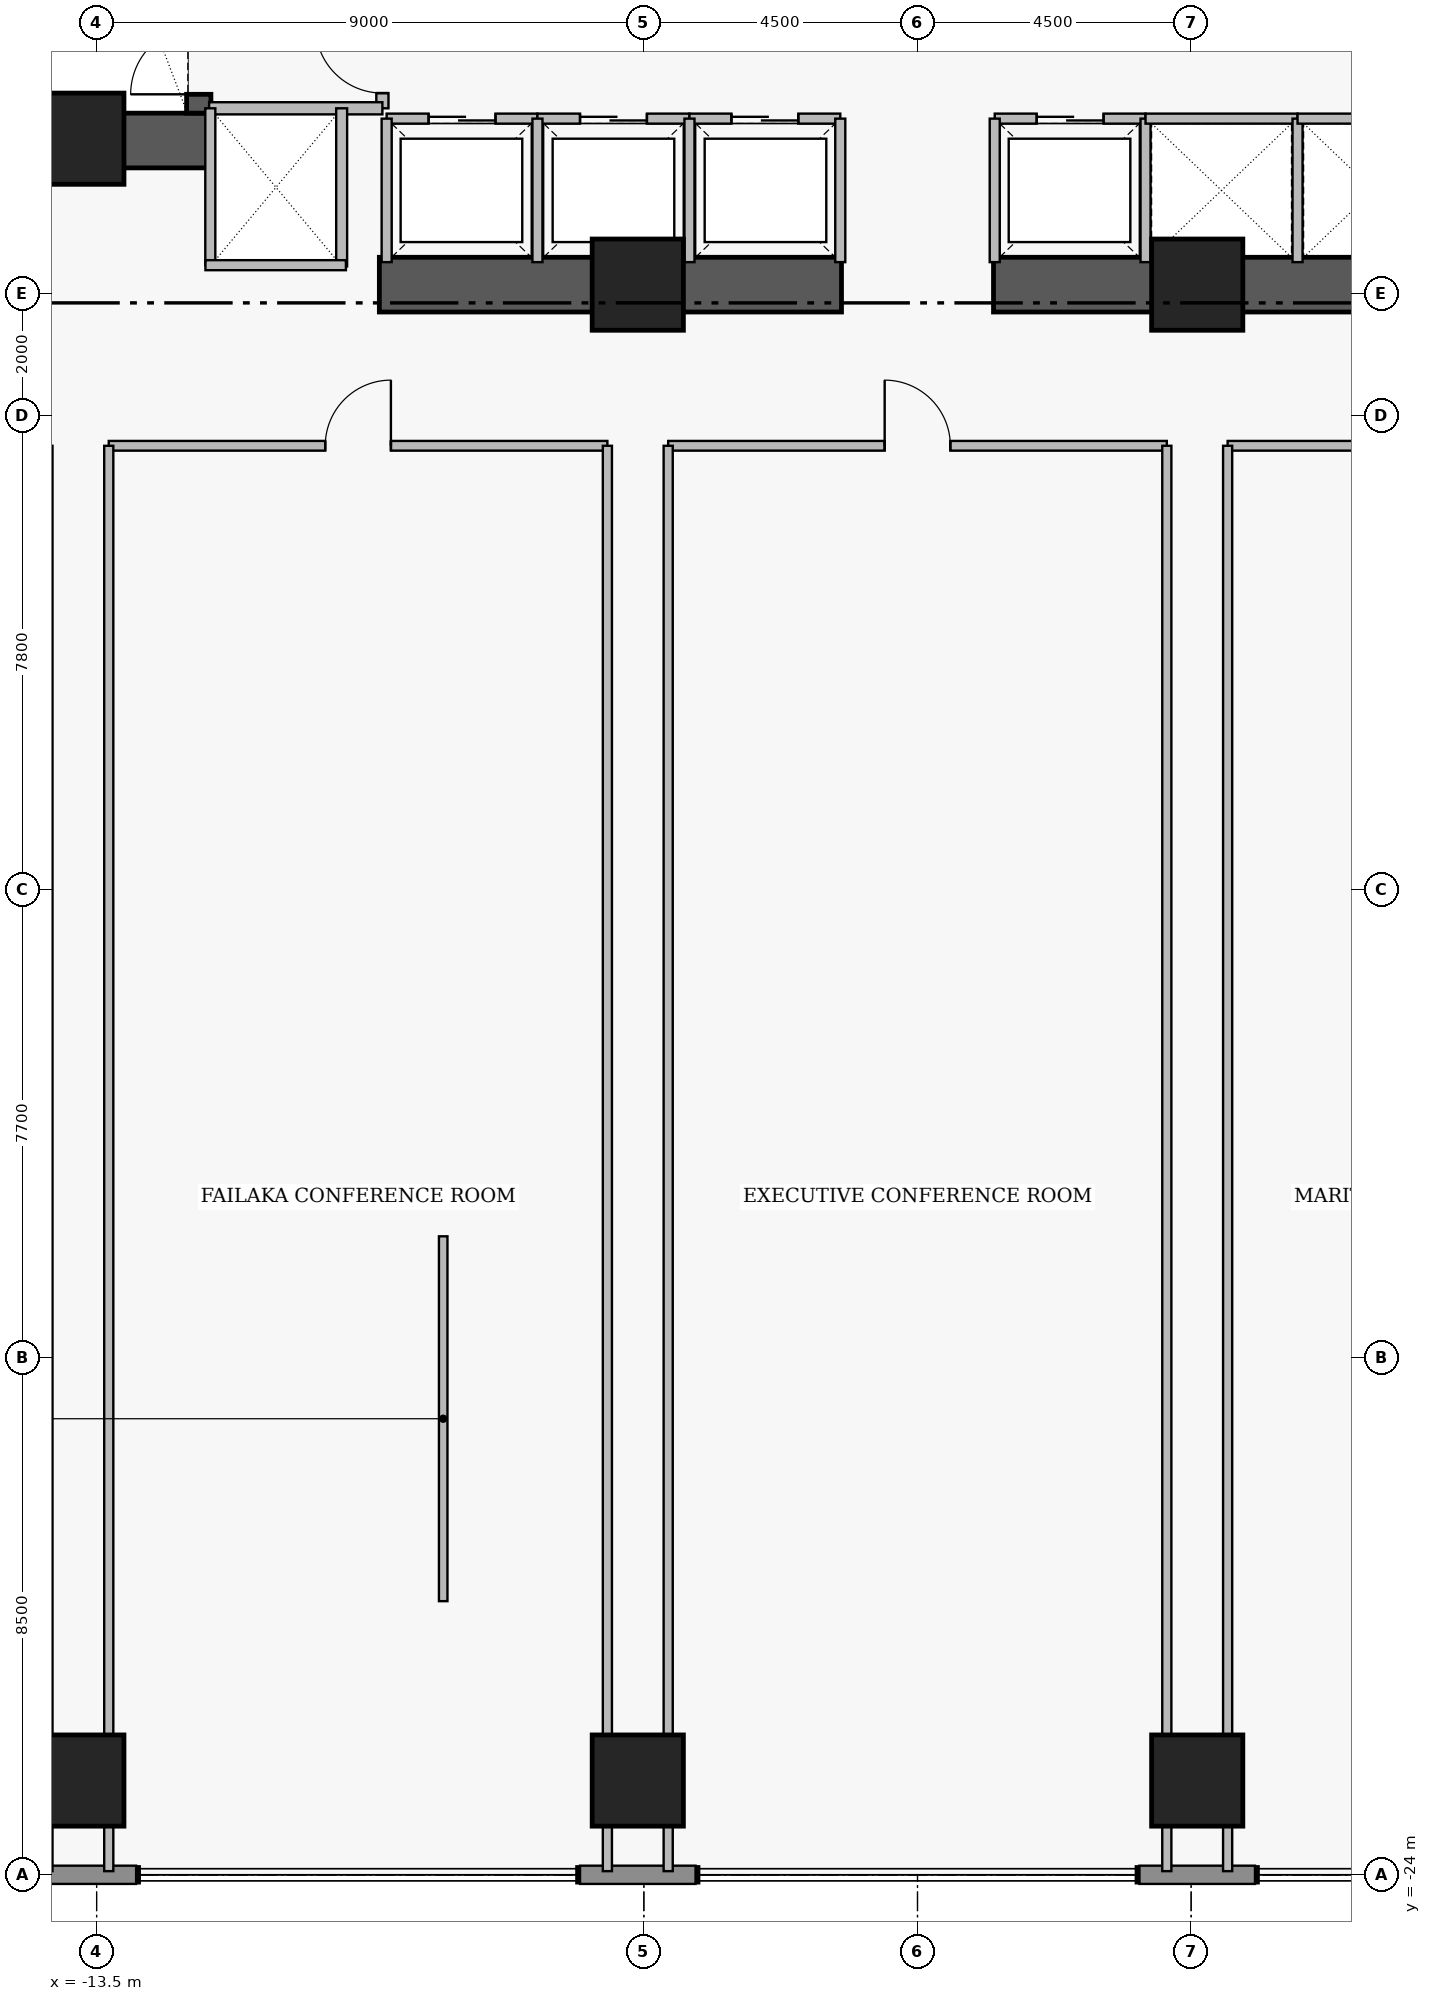
"""IFC4 building model, lengths in metres.
Left out: names, types, materials, properties, quantities, classifications, styles, units other than length and angle.
Written with IfcOpenShell. Run it as: python <this file> out.ifc"""

import sys

from ifc_helpers import new_model, si_unit, direction, frame, frame_2d, origin, origin_2d, place, context, subcontext, project, spatial, rectangle, extrude, element, fill, save


model = new_model("IFC4")
c1 = context("Model", 3, precision=1e-05, world=origin(), true_north=direction((0.0, 1.0)))
c2 = subcontext(c1, "Body", "Model", "MODEL_VIEW")
j1 = project(units=[si_unit("LENGTHUNIT", "METRE"), si_unit("PLANEANGLEUNIT", "RADIAN")], contexts=[c1])
p1 = place(None, origin())
s1 = spatial("IfcSite", under=j1, at=p1, CompositionType="ELEMENT")
p2 = place(p1, origin())
s2 = spatial("IfcBuilding", under=s1, at=p2, CompositionType="ELEMENT")
p3 = place(p2, frame((0.0, 0.0, 18.0)))
s3 = spatial("IfcBuildingStorey", under=s2, at=p3, CompositionType="ELEMENT", Elevation=18.0)
p4 = place(p3, frame((-16.31, 4.52, 0.0), z_axis=(0.0, 0.0, 1.0), x_axis=(1.0, 0.0, 0.0)))
e1 = element("IfcWall", 1, at=p4, inside=s3, PredefinedType="SHEAR", context=c2, shape_type="SweptSolid", body=[
    extrude(rectangle(XDim=4.71, YDim=0.9, at=frame_2d((2.355, 0.0))), origin(), (0.0, 0.0, 1.0), 4.61),
])
for number, where, z_axis, x_axis in (
    (2, (-8.85, 2.15, 0.0), (0.0, 0.0, 1.0), (1.0, 0.0, 0.0)),
    (3, (1.25, 2.15, 0.0), (0.0, 0.0, 1.0), (1.0, 0.0, 0.0)),
):
    element("IfcWall", number, at=place(p3, frame(where, z_axis=z_axis, x_axis=x_axis)), inside=s3, PredefinedType="SHEAR", context=c2, shape_type="SweptSolid", body=[
        extrude(rectangle(XDim=7.6, YDim=0.9, at=frame_2d((3.8, 0.0))), origin(), (0.0, 0.0, 1.0), 4.54),
    ])
p5 = place(p3, frame((-11.82, 4.97, 0.0), z_axis=(0.0, 0.0, 1.0), x_axis=(0.0, 1.0, 0.0)))
e4 = element("IfcWall", 4, at=p5, inside=s3, PredefinedType="SHEAR", context=c2, shape_type="SweptSolid", body=[
    extrude(rectangle(XDim=8.96, YDim=0.4, at=frame_2d((4.48, 0.0))), origin(), (0.0, 0.0, 1.0), 4.61),
])
p6 = place(p5, frame((0.31, 0.0, 0.0)))
e5 = element("IfcOpeningElement", 5, at=p6, cuts=e4, PredefinedType="OPENING", context=c2, shape_type="SweptSolid", body=[
    extrude(rectangle(XDim=1.12, YDim=2.22, at=frame_2d((0.56, 1.11))), frame((0.0, 0.21, 0.0), z_axis=(0.0, -1.0, 0.0), x_axis=(1.0, 0.0, 0.0)), (0.0, 0.0, 1.0), 0.42),
])
for number, where, z_axis, x_axis in (
    (6, (-13.8, 4.55, 0.0), (0.0, 0.0, 1.0), (1.0, 0.0, 0.0)),
    (7, (-4.6, 2.15, 0.0), (0.0, 0.0, 1.0), (1.0, 0.0, 0.0)),
    (8, (4.6, 2.15, 0.0), (0.0, 0.0, 1.0), (1.0, 0.0, 0.0)),
    (9, (-13.8, -22.45, 0.0), (0.0, 0.0, 1.0), (1.0, 0.0, 0.0)),
    (10, (-4.6, -22.45, 0.0), (0.0, 0.0, 1.0), (1.0, 0.0, 0.0)),
    (11, (4.6, -22.45, 0.0), (0.0, 0.0, 1.0), (1.0, 0.0, 0.0)),
):
    element("IfcColumn", number, at=place(p3, frame(where, z_axis=z_axis, x_axis=x_axis)), inside=s3, PredefinedType="COLUMN", context=c2, shape_type="SweptSolid", body=[
        extrude(rectangle(XDim=1.5, YDim=1.5, at=origin_2d()), origin(), (0.0, 0.0, 1.0), 4.8),
    ])
for number, where, z_axis, x_axis in (
    (12, (5.55, -24.0, 0.0), (0.0, 0.0, 1.0), (-1.0, 0.0, 0.0)),
    (13, (-3.65, -24.0, 0.0), (0.0, 0.0, 1.0), (-1.0, 0.0, 0.0)),
):
    element("IfcWall", number, at=place(p3, frame(where, z_axis=z_axis, x_axis=x_axis)), inside=s3, PredefinedType="STANDARD", context=c2, shape_type="SweptSolid", body=[
        extrude(rectangle(XDim=1.9, YDim=0.3, at=frame_2d((0.95, 0.0))), origin(), (0.0, 0.0, 1.0), 4.54),
    ])
p7 = place(p3, frame((-12.85, -24.0, 0.0), z_axis=(0.0, 0.0, 1.0), x_axis=(-1.0, 0.0, 0.0)))
e14 = element("IfcWall", 14, at=p7, inside=s3, PredefinedType="STANDARD", context=c2, shape_type="SweptSolid", body=[
    extrude(rectangle(XDim=1.9, YDim=0.3, at=frame_2d((0.95, 0.0))), origin(), (0.0, 0.0, 1.0), 4.54),
])
p8 = place(p3, frame((-8.8, 5.05, 0.0), z_axis=(0.0, 0.0, 1.0), x_axis=(0.0, 1.0, 0.0)))
e15 = element("IfcWall", 15, at=p8, inside=s3, PredefinedType="PARTITIONING", context=c2, shape_type="SweptSolid", body=[
    extrude(rectangle(XDim=6.1, YDim=0.2, at=frame_2d((3.05, 0.0))), origin(), (0.0, 0.0, 1.0), 4.54),
])
p9 = place(p8, frame((0.25, 0.0, 0.0)))
e16 = element("IfcOpeningElement", 16, at=p9, cuts=e15, PredefinedType="OPENING", context=c2, shape_type="SweptSolid", body=[
    extrude(rectangle(XDim=1.1, YDim=2.2, at=frame_2d((0.55, 1.1))), frame((0.0, 0.11, 0.0), z_axis=(0.0, -1.0, 0.0), x_axis=(1.0, 0.0, 0.0)), (0.0, 0.0, 1.0), 0.22),
])
p10 = place(p8, frame((3.85, 0.0, 0.0)))
e17 = element("IfcOpeningElement", 17, at=p10, cuts=e15, PredefinedType="OPENING", context=c2, shape_type="SweptSolid", body=[
    extrude(rectangle(XDim=1.1, YDim=2.2, at=frame_2d((0.55, 1.1))), frame((0.0, 0.11, 0.0), z_axis=(0.0, -1.0, 0.0), x_axis=(1.0, 0.0, 0.0)), (0.0, 0.0, 1.0), 0.22),
])
p11 = place(p3, frame((-8.73, 4.88, 0.0), z_axis=(0.0, 0.0, 1.0), x_axis=(1.0, 0.0, 0.0)))
e18 = element("IfcWall", 18, at=p11, inside=s3, PredefinedType="PARTITIONING", context=c2, shape_type="SweptSolid", body=[
    extrude(rectangle(XDim=2.48, YDim=0.165, at=frame_2d((1.24, 0.0))), origin(), (0.0, 0.0, 1.0), 4.54),
])
p12 = place(p11, frame((0.69, 0.0, 0.0)))
e19 = element("IfcOpeningElement", 19, at=p12, cuts=e18, PredefinedType="OPENING", context=c2, shape_type="SweptSolid", body=[
    extrude(rectangle(XDim=1.1, YDim=2.25, at=frame_2d((0.55, 1.125))), frame((0.0, 0.093, 0.0), z_axis=(0.0, -1.0, 0.0), x_axis=(1.0, 0.0, 0.0)), (0.0, 0.0, 1.0), 0.185),
])
p13 = place(p3, frame((-6.25, 4.88, 0.0), z_axis=(0.0, 0.0, 1.0), x_axis=(1.0, 0.0, 0.0)))
e20 = element("IfcWall", 20, at=p13, inside=s3, PredefinedType="PARTITIONING", context=c2, shape_type="SweptSolid", body=[
    extrude(rectangle(XDim=2.5, YDim=0.165, at=frame_2d((1.25, 0.0))), origin(), (0.0, 0.0, 1.0), 4.54),
])
p14 = place(p13, frame((0.7, 0.0, 0.0)))
e21 = element("IfcOpeningElement", 21, at=p14, cuts=e20, PredefinedType="OPENING", context=c2, shape_type="SweptSolid", body=[
    extrude(rectangle(XDim=1.1, YDim=2.25, at=frame_2d((0.55, 1.125))), frame((0.0, 0.093, 0.0), z_axis=(0.0, -1.0, 0.0), x_axis=(1.0, 0.0, 0.0)), (0.0, 0.0, 1.0), 0.185),
])
p15 = place(p3, frame((-3.75, 4.88, 0.0), z_axis=(0.0, 0.0, 1.0), x_axis=(1.0, 0.0, 0.0)))
e22 = element("IfcWall", 22, at=p15, inside=s3, PredefinedType="PARTITIONING", context=c2, shape_type="SweptSolid", body=[
    extrude(rectangle(XDim=2.48, YDim=0.165, at=frame_2d((1.24, 0.0))), origin(), (0.0, 0.0, 1.0), 4.54),
])
p16 = place(p15, frame((0.69, 0.0, 0.0)))
e23 = element("IfcOpeningElement", 23, at=p16, cuts=e22, PredefinedType="OPENING", context=c2, shape_type="SweptSolid", body=[
    extrude(rectangle(XDim=1.1, YDim=2.25, at=frame_2d((0.55, 1.125))), frame((0.0, 0.093, 0.0), z_axis=(0.0, -1.0, 0.0), x_axis=(1.0, 0.0, 0.0)), (0.0, 0.0, 1.0), 0.185),
])
p17 = place(p3, frame((1.27, 4.88, 0.0), z_axis=(0.0, 0.0, 1.0), x_axis=(1.0, 0.0, 0.0)))
e24 = element("IfcWall", 24, at=p17, inside=s3, PredefinedType="PARTITIONING", context=c2, shape_type="SweptSolid", body=[
    extrude(rectangle(XDim=2.48, YDim=0.165, at=frame_2d((1.24, 0.0))), origin(), (0.0, 0.0, 1.0), 4.54),
])
p18 = place(p17, frame((0.69, 0.0, 0.0)))
e25 = element("IfcOpeningElement", 25, at=p18, cuts=e24, PredefinedType="OPENING", context=c2, shape_type="SweptSolid", body=[
    extrude(rectangle(XDim=1.1, YDim=2.25, at=frame_2d((0.55, 1.125))), frame((0.0, 0.093, 0.0), z_axis=(0.0, -1.0, 0.0), x_axis=(1.0, 0.0, 0.0)), (0.0, 0.0, 1.0), 0.185),
])
p19 = place(p3, frame((-13.3, -0.5, 0.0), z_axis=(0.0, 0.0, 1.0), x_axis=(1.0, 0.0, 0.0)))
e26 = element("IfcWall", 26, at=p19, inside=s3, PredefinedType="PARTITIONING", context=c2, shape_type="SweptSolid", body=[
    extrude(rectangle(XDim=8.2, YDim=0.16, at=frame_2d((4.1, 0.0))), origin(), (0.0, 0.0, 1.0), 4.54),
])
p20 = place(p19, frame((3.56, 0.0, 0.0)))
e27 = element("IfcOpeningElement", 27, at=p20, cuts=e26, PredefinedType="OPENING", context=c2, shape_type="SweptSolid", body=[
    extrude(rectangle(XDim=1.08, YDim=2.18, at=frame_2d((0.54, 1.09))), frame((0.0, 0.09, 0.0), z_axis=(0.0, -1.0, 0.0), x_axis=(1.0, 0.0, 0.0)), (0.0, 0.0, 1.0), 0.18),
])
p21 = place(p3, frame((-4.1, -0.5, 0.0), z_axis=(0.0, 0.0, 1.0), x_axis=(1.0, 0.0, 0.0)))
e28 = element("IfcWall", 28, at=p21, inside=s3, PredefinedType="PARTITIONING", context=c2, shape_type="SweptSolid", body=[
    extrude(rectangle(XDim=8.2, YDim=0.16, at=frame_2d((4.1, 0.0))), origin(), (0.0, 0.0, 1.0), 4.54),
])
p22 = place(p21, frame((3.56, 0.0, 0.0)))
e29 = element("IfcOpeningElement", 29, at=p22, cuts=e28, PredefinedType="OPENING", context=c2, shape_type="SweptSolid", body=[
    extrude(rectangle(XDim=1.08, YDim=2.18, at=frame_2d((0.54, 1.09))), frame((0.0, 0.09, 0.0), z_axis=(0.0, -1.0, 0.0), x_axis=(1.0, 0.0, 0.0)), (0.0, 0.0, 1.0), 0.18),
])
p23 = place(p3, frame((5.1, -0.5, 0.0), z_axis=(0.0, 0.0, 1.0), x_axis=(1.0, 0.0, 0.0)))
e30 = element("IfcWall", 30, at=p23, inside=s3, PredefinedType="PARTITIONING", context=c2, shape_type="SweptSolid", body=[
    extrude(rectangle(XDim=8.2, YDim=0.16, at=frame_2d((4.1, 0.0))), origin(), (0.0, 0.0, 1.0), 4.54),
])
p24 = place(p23, frame((3.56, 0.0, 0.0)))
e31 = element("IfcOpeningElement", 31, at=p24, cuts=e30, PredefinedType="OPENING", context=c2, shape_type="SweptSolid", body=[
    extrude(rectangle(XDim=1.08, YDim=2.18, at=frame_2d((0.54, 1.09))), frame((0.0, 0.09, 0.0), z_axis=(0.0, -1.0, 0.0), x_axis=(1.0, 0.0, 0.0)), (0.0, 0.0, 1.0), 0.18),
])
p25 = place(p3, frame((-11.65, 5.05, 0.0), z_axis=(0.0, 0.0, 1.0), x_axis=(1.0, 0.0, 0.0)))
e32 = element("IfcWall", 32, at=p25, inside=s3, PredefinedType="PARTITIONING", context=c2, shape_type="SweptSolid", body=[
    extrude(rectangle(XDim=2.85, YDim=0.2, at=frame_2d((1.425, 0.0))), origin(), (0.0, 0.0, 1.0), 4.54),
])
for number, where, z_axis, x_axis in (
    (33, (-8.73, 2.52, 0.0), (0.0, 0.0, 1.0), (0.0, 1.0, 0.0)),
    (34, (-6.25, 2.52, 0.0), (0.0, 0.0, 1.0), (0.0, 1.0, 0.0)),
    (35, (-3.75, 2.52, 0.0), (0.0, 0.0, 1.0), (0.0, 1.0, 0.0)),
    (36, (-1.27, 2.52, 0.0), (0.0, 0.0, 1.0), (0.0, 1.0, 0.0)),
    (37, (1.27, 2.52, 0.0), (0.0, 0.0, 1.0), (0.0, 1.0, 0.0)),
    (38, (3.75, 2.52, 0.0), (0.0, 0.0, 1.0), (0.0, 1.0, 0.0)),
):
    element("IfcWall", number, at=place(p3, frame(where, z_axis=z_axis, x_axis=x_axis)), inside=s3, PredefinedType="PARTITIONING", context=c2, shape_type="SweptSolid", body=[
        extrude(rectangle(XDim=2.36, YDim=0.165, at=frame_2d((1.18, 0.0))), origin(), (0.0, 0.0, 1.0), 4.54),
    ])
p26 = place(p3, frame((3.75, 4.88, 0.0), z_axis=(0.0, 0.0, 1.0), x_axis=(1.0, 0.0, 0.0)))
e39 = element("IfcWall", 39, at=p26, inside=s3, PredefinedType="PARTITIONING", context=c2, shape_type="SweptSolid", body=[
    extrude(rectangle(XDim=2.5, YDim=0.165, at=frame_2d((1.25, 0.0))), origin(), (0.0, 0.0, 1.0), 4.54),
])
p27 = place(p3, frame((6.25, 2.52, 0.0), z_axis=(0.0, 0.0, 1.0), x_axis=(0.0, 1.0, 0.0)))
e40 = element("IfcWall", 40, at=p27, inside=s3, PredefinedType="PARTITIONING", context=c2, shape_type="SweptSolid", body=[
    extrude(rectangle(XDim=2.36, YDim=0.165, at=frame_2d((1.18, 0.0))), origin(), (0.0, 0.0, 1.0), 4.54),
])
p28 = place(p3, frame((6.25, 4.88, 0.0), z_axis=(0.0, 0.0, 1.0), x_axis=(1.0, 0.0, 0.0)))
e41 = element("IfcWall", 41, at=p28, inside=s3, PredefinedType="PARTITIONING", context=c2, shape_type="SweptSolid", body=[
    extrude(rectangle(XDim=2.48, YDim=0.165, at=frame_2d((1.24, 0.0))), origin(), (0.0, 0.0, 1.0), 4.54),
])
p29 = place(p3, frame((-9.47, 2.45, 0.0), z_axis=(0.0, 0.0, 1.0), x_axis=(0.0, 1.0, 0.0)))
e42 = element("IfcWall", 42, at=p29, inside=s3, PredefinedType="PARTITIONING", context=c2, shape_type="SweptSolid", body=[
    extrude(rectangle(XDim=2.6, YDim=0.18, at=frame_2d((1.3, 0.0))), origin(), (0.0, 0.0, 1.0), 4.54),
])
p30 = place(p3, frame((-11.63, 2.47, 0.0), z_axis=(0.0, 0.0, 1.0), x_axis=(0.0, 1.0, 0.0)))
e43 = element("IfcWall", 43, at=p30, inside=s3, PredefinedType="PARTITIONING", context=c2, shape_type="SweptSolid", body=[
    extrude(rectangle(XDim=2.58, YDim=0.165, at=frame_2d((1.29, 0.0))), origin(), (0.0, 0.0, 1.0), 4.54),
])
p31 = place(p3, frame((-11.71, 2.47, 0.0), z_axis=(0.0, 0.0, 1.0), x_axis=(1.0, 0.0, 0.0)))
e44 = element("IfcWall", 44, at=p31, inside=s3, PredefinedType="PARTITIONING", context=c2, shape_type="SweptSolid", body=[
    extrude(rectangle(XDim=2.31, YDim=0.165, at=frame_2d((1.155, 0.0))), origin(), (0.0, 0.0, 1.0), 3.14),
])
for number, where, z_axis, x_axis in (
    (45, (-13.3, -23.94, 0.0), (0.0, 0.0, 1.0), (0.0, 1.0, 0.0)),
    (46, (-5.1, -23.94, 0.0), (0.0, 0.0, 1.0), (0.0, 1.0, 0.0)),
    (47, (-4.1, -23.94, 0.0), (0.0, 0.0, 1.0), (0.0, 1.0, 0.0)),
    (48, (4.1, -23.94, 0.0), (0.0, 0.0, 1.0), (0.0, 1.0, 0.0)),
    (49, (5.1, -23.94, 0.0), (0.0, 0.0, 1.0), (0.0, 1.0, 0.0)),
):
    element("IfcWall", number, at=place(p3, frame(where, z_axis=z_axis, x_axis=x_axis)), inside=s3, PredefinedType="PARTITIONING", context=c2, shape_type="SweptSolid", body=[
        extrude(rectangle(XDim=23.44, YDim=0.15, at=frame_2d((11.72, 0.0))), origin(), (0.0, 0.0, 1.0), 4.54),
    ])
p32 = place(p3, frame((-7.8, -19.5, 0.0), z_axis=(0.0, 0.0, 1.0), x_axis=(0.0, 1.0, 0.0)))
e50 = element("IfcWall", 50, at=p32, inside=s3, PredefinedType="MOVABLE", context=c2, shape_type="SweptSolid", body=[
    extrude(rectangle(XDim=6.0, YDim=0.14, at=frame_2d((3.0, 0.0))), origin(), (0.0, 0.0, 1.0), 4.54),
])
p33 = place(p6, origin())
e51 = element("IfcDoor", 51, at=p33, inside=s3, OperationType="SINGLE_SWING_LEFT", PredefinedType="DOOR", context=c2, shape_type="SweptSolid", body=[
    extrude(rectangle(XDim=1.12, YDim=2.22, at=frame_2d((0.56, 1.11))), frame((0.0, 0.025, 0.0), z_axis=(0.0, -1.0, 0.0), x_axis=(1.0, 0.0, 0.0)), (0.0, 0.0, 1.0), 0.05),
])
fill(e5, e51)
p34 = place(p9, origin())
e52 = element("IfcDoor", 52, at=p34, inside=s3, OperationType="SINGLE_SWING_RIGHT", PredefinedType="DOOR", context=c2, shape_type="SweptSolid", body=[
    extrude(rectangle(XDim=1.1, YDim=2.2, at=frame_2d((0.55, 1.1))), frame((0.0, 0.025, 0.0), z_axis=(0.0, -1.0, 0.0), x_axis=(1.0, 0.0, 0.0)), (0.0, 0.0, 1.0), 0.05),
])
fill(e16, e52)
p35 = place(p12, origin())
e53 = element("IfcDoor", 53, at=p35, inside=s3, OperationType="SLIDING_TO_LEFT", PredefinedType="DOOR", context=c2, shape_type="SweptSolid", body=[
    extrude(rectangle(XDim=1.1, YDim=2.25, at=frame_2d((0.55, 1.125))), frame((0.0, 0.025, 0.0), z_axis=(0.0, -1.0, 0.0), x_axis=(1.0, 0.0, 0.0)), (0.0, 0.0, 1.0), 0.05),
])
fill(e19, e53)
p36 = place(p14, origin())
e54 = element("IfcDoor", 54, at=p36, inside=s3, OperationType="SLIDING_TO_LEFT", PredefinedType="DOOR", context=c2, shape_type="SweptSolid", body=[
    extrude(rectangle(XDim=1.1, YDim=2.25, at=frame_2d((0.55, 1.125))), frame((0.0, 0.025, 0.0), z_axis=(0.0, -1.0, 0.0), x_axis=(1.0, 0.0, 0.0)), (0.0, 0.0, 1.0), 0.05),
])
fill(e21, e54)
p37 = place(p16, origin())
e55 = element("IfcDoor", 55, at=p37, inside=s3, OperationType="SLIDING_TO_LEFT", PredefinedType="DOOR", context=c2, shape_type="SweptSolid", body=[
    extrude(rectangle(XDim=1.1, YDim=2.25, at=frame_2d((0.55, 1.125))), frame((0.0, 0.025, 0.0), z_axis=(0.0, -1.0, 0.0), x_axis=(1.0, 0.0, 0.0)), (0.0, 0.0, 1.0), 0.05),
])
fill(e23, e55)
p38 = place(p18, origin())
e56 = element("IfcDoor", 56, at=p38, inside=s3, OperationType="SLIDING_TO_LEFT", PredefinedType="DOOR", context=c2, shape_type="SweptSolid", body=[
    extrude(rectangle(XDim=1.1, YDim=2.25, at=frame_2d((0.55, 1.125))), frame((0.0, 0.025, 0.0), z_axis=(0.0, -1.0, 0.0), x_axis=(1.0, 0.0, 0.0)), (0.0, 0.0, 1.0), 0.05),
])
fill(e25, e56)
p39 = place(p20, origin())
e57 = element("IfcDoor", 57, at=p39, inside=s3, OperationType="SINGLE_SWING_RIGHT", PredefinedType="DOOR", context=c2, shape_type="SweptSolid", body=[
    extrude(rectangle(XDim=1.08, YDim=2.18, at=frame_2d((0.54, 1.09))), frame((0.0, 0.025, 0.0), z_axis=(0.0, -1.0, 0.0), x_axis=(1.0, 0.0, 0.0)), (0.0, 0.0, 1.0), 0.05),
])
fill(e27, e57)
p40 = place(p22, origin())
e58 = element("IfcDoor", 58, at=p40, inside=s3, OperationType="SINGLE_SWING_LEFT", PredefinedType="DOOR", context=c2, shape_type="SweptSolid", body=[
    extrude(rectangle(XDim=1.08, YDim=2.18, at=frame_2d((0.54, 1.09))), frame((0.0, 0.025, 0.0), z_axis=(0.0, -1.0, 0.0), x_axis=(1.0, 0.0, 0.0)), (0.0, 0.0, 1.0), 0.05),
])
fill(e29, e58)
save(model, sys.argv[1])
